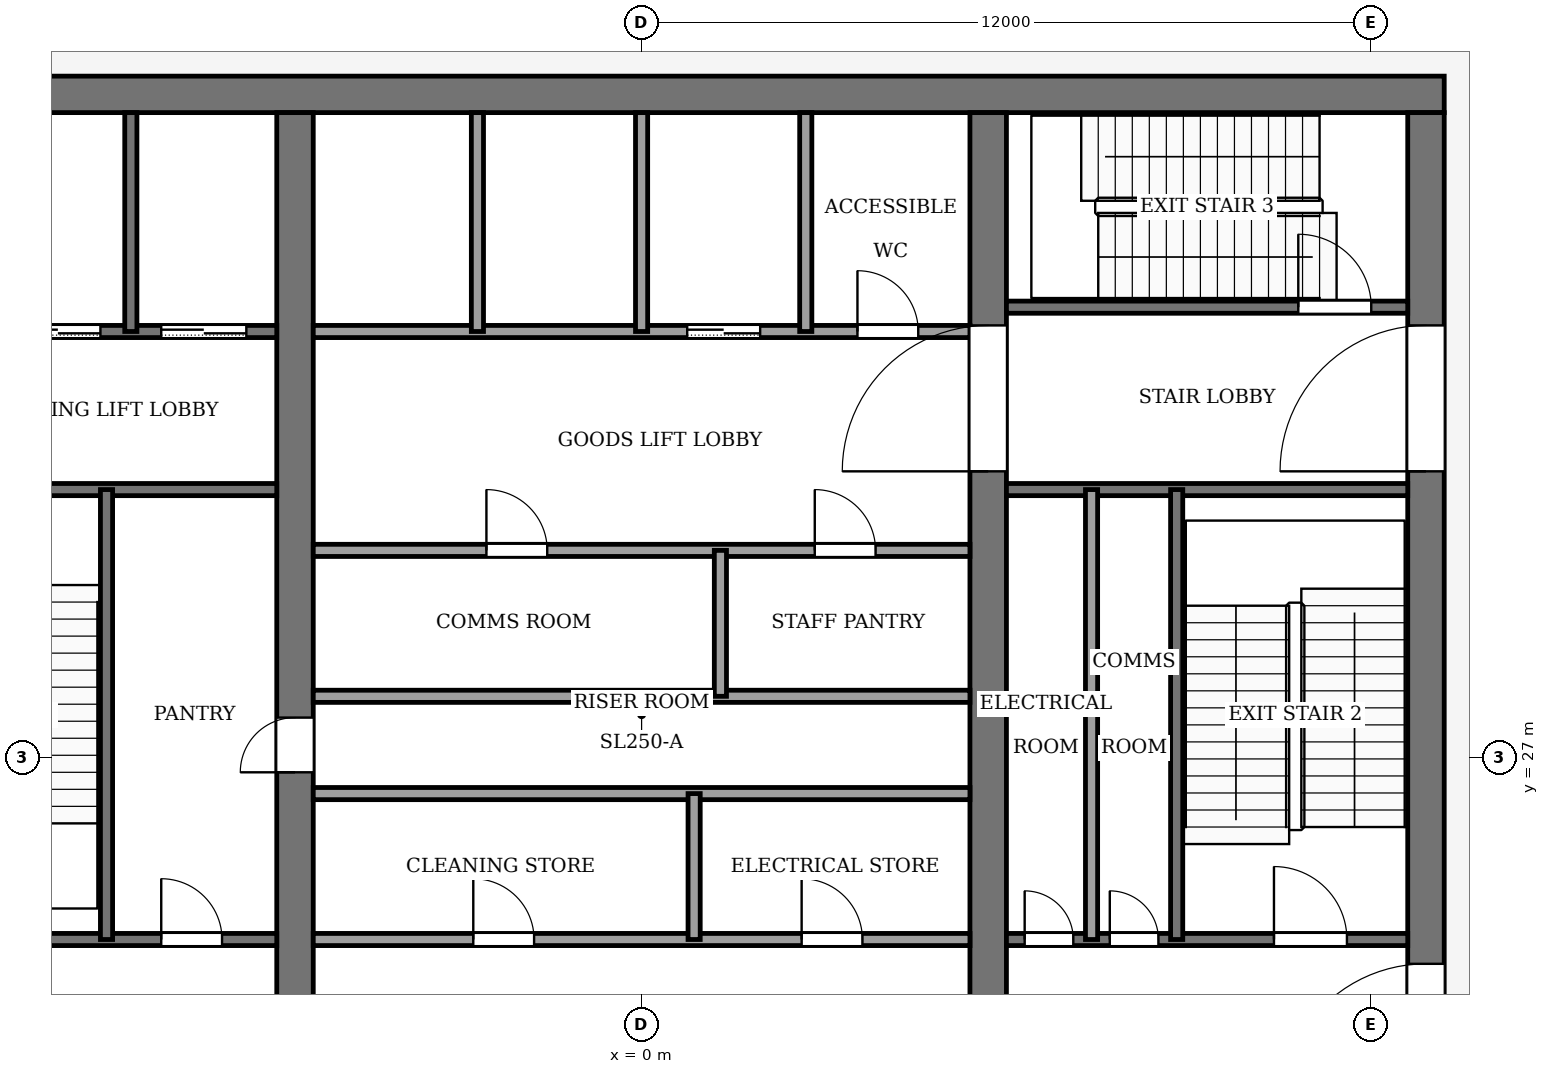
"""IFC4 building model, lengths in metres.
Left out: names, types, materials, properties, quantities, classifications, styles, units other than length and angle.
Written with IfcOpenShell. Run it as: python <this file> out.ifc"""

import sys

from ifc_helpers import new_model, si_unit, direction, frame, frame_2d, origin, place, context, subcontext, project, spatial, rectangle, extrude, element, fill, save


model = new_model("IFC4")
c1 = context("Model", 3, precision=1e-05, world=origin(), true_north=direction((0.0, 1.0)))
c2 = subcontext(c1, "Body", "Model", "MODEL_VIEW")
j1 = project(units=[si_unit("LENGTHUNIT", "METRE"), si_unit("PLANEANGLEUNIT", "RADIAN")], contexts=[c1])
p1 = place(None, origin())
s1 = spatial("IfcSite", under=j1, at=p1, CompositionType="ELEMENT")
p2 = place(p1, origin())
s2 = spatial("IfcBuilding", under=s1, at=p2, CompositionType="ELEMENT")
p3 = place(p2, frame((0.0, 0.0, 289.0)))
s3 = spatial("IfcBuildingStorey", under=s2, at=p3, CompositionType="ELEMENT", Elevation=289.0)
p4 = place(p3, frame((-13.2, 37.9, -0.13), z_axis=(0.0, 0.0, 1.0), x_axis=(1.0, 0.0, 0.0)))
e1 = element("IfcWall", 1, at=p4, inside=s3, PredefinedType="SHEAR", context=c2, shape_type="SweptSolid", body=[
    extrude(rectangle(XDim=26.4, YDim=0.6, at=frame_2d((13.2, 0.0))), origin(), (0.0, 0.0, 1.0), 5.0),
])
p5 = place(p3, frame((12.9, 18.4, -0.13), z_axis=(0.0, 0.0, 1.0), x_axis=(0.0, 1.0, 0.0)))
e2 = element("IfcWall", 2, at=p5, inside=s3, PredefinedType="SHEAR", context=c2, shape_type="SweptSolid", body=[
    extrude(rectangle(XDim=19.2, YDim=0.6, at=frame_2d((9.6, 0.0))), origin(), (0.0, 0.0, 1.0), 5.0),
])
p6 = place(p5, frame((2.8, 0.0, 0.13)))
e3 = element("IfcOpeningElement", 3, at=p6, cuts=e2, PredefinedType="OPENING", context=c2, shape_type="SweptSolid", body=[
    extrude(rectangle(XDim=2.4, YDim=2.4, at=frame_2d((1.2, 1.2))), frame((0.0, 0.31, 0.0), z_axis=(0.0, -1.0, 0.0), x_axis=(1.0, 0.0, 0.0)), (0.0, 0.0, 1.0), 0.62),
])
p7 = place(p5, frame((13.3, 0.0, 0.13)))
e4 = element("IfcOpeningElement", 4, at=p7, cuts=e2, PredefinedType="OPENING", context=c2, shape_type="SweptSolid", body=[
    extrude(rectangle(XDim=2.4, YDim=2.4, at=frame_2d((1.2, 1.2))), frame((0.0, 0.31, 0.0), z_axis=(0.0, -1.0, 0.0), x_axis=(1.0, 0.0, 0.0)), (0.0, 0.0, 1.0), 0.62),
])
p8 = place(p3, frame((-5.7, 18.4, -0.13), z_axis=(0.0, 0.0, 1.0), x_axis=(0.0, 1.0, 0.0)))
e5 = element("IfcWall", 5, at=p8, inside=s3, PredefinedType="SHEAR", context=c2, shape_type="SweptSolid", body=[
    extrude(rectangle(XDim=19.2, YDim=0.6, at=frame_2d((9.6, 0.0))), origin(), (0.0, 0.0, 1.0), 5.0),
])
p9 = place(p8, frame((8.35, 0.0, 0.13)))
e6 = element("IfcOpeningElement", 6, at=p9, cuts=e5, PredefinedType="OPENING", context=c2, shape_type="SweptSolid", body=[
    extrude(rectangle(XDim=0.9, YDim=2.1, at=frame_2d((0.45, 1.05))), frame((0.0, 0.31, 0.0), z_axis=(0.0, -1.0, 0.0), x_axis=(1.0, 0.0, 0.0)), (0.0, 0.0, 1.0), 0.62),
])
p10 = place(p3, frame((5.7, 18.4, -0.13), z_axis=(0.0, 0.0, 1.0), x_axis=(0.0, 1.0, 0.0)))
e7 = element("IfcWall", 7, at=p10, inside=s3, PredefinedType="SHEAR", context=c2, shape_type="SweptSolid", body=[
    extrude(rectangle(XDim=19.2, YDim=0.6, at=frame_2d((9.6, 0.0))), origin(), (0.0, 0.0, 1.0), 5.0),
])
p11 = place(p10, frame((13.3, 0.0, 0.13)))
e8 = element("IfcOpeningElement", 8, at=p11, cuts=e7, PredefinedType="OPENING", context=c2, shape_type="SweptSolid", body=[
    extrude(rectangle(XDim=2.4, YDim=2.4, at=frame_2d((1.2, 1.2))), frame((0.0, 0.31, 0.0), z_axis=(0.0, -1.0, 0.0), x_axis=(1.0, 0.0, 0.0)), (0.0, 0.0, 1.0), 0.62),
])
p12 = place(p3, frame((-12.6, 24.0, 0.0), z_axis=(0.0, 0.0, 1.0), x_axis=(1.0, 0.0, 0.0)))
e9 = element("IfcWall", 9, at=p12, inside=s3, PredefinedType="PARTITIONING", context=c2, shape_type="SweptSolid", body=[
    extrude(rectangle(XDim=6.6, YDim=0.2, at=frame_2d((3.3, 0.0))), origin(), (0.0, 0.0, 1.0), 4.87),
])
p13 = place(p12, frame((4.7, 0.0, 0.0)))
e10 = element("IfcOpeningElement", 10, at=p13, cuts=e9, PredefinedType="OPENING", context=c2, shape_type="SweptSolid", body=[
    extrude(rectangle(XDim=1.0, YDim=2.1, at=frame_2d((0.5, 1.05))), frame((0.0, 0.11, 0.0), z_axis=(0.0, -1.0, 0.0), x_axis=(1.0, 0.0, 0.0)), (0.0, 0.0, 1.0), 0.22),
])
p14 = place(p3, frame((-5.4, 24.0, 0.0), z_axis=(0.0, 0.0, 1.0), x_axis=(1.0, 0.0, 0.0)))
e11 = element("IfcWall", 11, at=p14, inside=s3, PredefinedType="PARTITIONING", context=c2, shape_type="SweptSolid", body=[
    extrude(rectangle(XDim=10.8, YDim=0.2, at=frame_2d((5.4, 0.0))), origin(), (0.0, 0.0, 1.0), 4.87),
])
p15 = place(p14, frame((2.632, 0.0, 0.0)))
e12 = element("IfcOpeningElement", 12, at=p15, cuts=e11, PredefinedType="OPENING", context=c2, shape_type="SweptSolid", body=[
    extrude(rectangle(XDim=1.0, YDim=2.1, at=frame_2d((0.5, 1.05))), frame((0.0, 0.11, 0.0), z_axis=(0.0, -1.0, 0.0), x_axis=(1.0, 0.0, 0.0)), (0.0, 0.0, 1.0), 0.22),
])
p16 = place(p14, frame((8.032, 0.0, 0.0)))
e13 = element("IfcOpeningElement", 13, at=p16, cuts=e11, PredefinedType="OPENING", context=c2, shape_type="SweptSolid", body=[
    extrude(rectangle(XDim=1.0, YDim=2.1, at=frame_2d((0.5, 1.05))), frame((0.0, 0.11, 0.0), z_axis=(0.0, -1.0, 0.0), x_axis=(1.0, 0.0, 0.0)), (0.0, 0.0, 1.0), 0.22),
])
p17 = place(p3, frame((6.0, 24.0, 0.0), z_axis=(0.0, 0.0, 1.0), x_axis=(1.0, 0.0, 0.0)))
e14 = element("IfcWall", 14, at=p17, inside=s3, PredefinedType="PARTITIONING", context=c2, shape_type="SweptSolid", body=[
    extrude(rectangle(XDim=6.6, YDim=0.2, at=frame_2d((3.3, 0.0))), origin(), (0.0, 0.0, 1.0), 4.87),
])
p18 = place(p17, frame((0.3, 0.0, 0.0)))
e15 = element("IfcOpeningElement", 15, at=p18, cuts=e14, PredefinedType="OPENING", context=c2, shape_type="SweptSolid", body=[
    extrude(rectangle(XDim=0.8, YDim=2.1, at=frame_2d((0.4, 1.05))), frame((0.0, 0.11, 0.0), z_axis=(0.0, -1.0, 0.0), x_axis=(1.0, 0.0, 0.0)), (0.0, 0.0, 1.0), 0.22),
])
p19 = place(p17, frame((1.7, 0.0, 0.0)))
e16 = element("IfcOpeningElement", 16, at=p19, cuts=e14, PredefinedType="OPENING", context=c2, shape_type="SweptSolid", body=[
    extrude(rectangle(XDim=0.8, YDim=2.1, at=frame_2d((0.4, 1.05))), frame((0.0, 0.11, 0.0), z_axis=(0.0, -1.0, 0.0), x_axis=(1.0, 0.0, 0.0)), (0.0, 0.0, 1.0), 0.22),
])
p20 = place(p17, frame((4.4, 0.0, 0.0)))
e17 = element("IfcOpeningElement", 17, at=p20, cuts=e14, PredefinedType="OPENING", context=c2, shape_type="SweptSolid", body=[
    extrude(rectangle(XDim=1.2, YDim=2.2, at=frame_2d((0.6, 1.1))), frame((0.0, 0.11, 0.0), z_axis=(0.0, -1.0, 0.0), x_axis=(1.0, 0.0, 0.0)), (0.0, 0.0, 1.0), 0.22),
])
for number, where, z_axis, x_axis in (
    (18, (-5.4, 26.4, 0.0), (0.0, 0.0, 1.0), (1.0, 0.0, 0.0)),
    (19, (-5.4, 28.0, 0.0), (0.0, 0.0, 1.0), (1.0, 0.0, 0.0)),
):
    element("IfcWall", number, at=place(p3, frame(where, z_axis=z_axis, x_axis=x_axis)), inside=s3, PredefinedType="PARTITIONING", context=c2, shape_type="SweptSolid", body=[
        extrude(rectangle(XDim=10.8, YDim=0.2, at=frame_2d((5.4, 0.0))), origin(), (0.0, 0.0, 1.0), 4.87),
    ])
p21 = place(p3, frame((-5.4, 30.4, 0.0), z_axis=(0.0, 0.0, 1.0), x_axis=(1.0, 0.0, 0.0)))
e20 = element("IfcWall", 20, at=p21, inside=s3, PredefinedType="PARTITIONING", context=c2, shape_type="SweptSolid", body=[
    extrude(rectangle(XDim=10.8, YDim=0.2, at=frame_2d((5.4, 0.0))), origin(), (0.0, 0.0, 1.0), 4.87),
])
p22 = place(p21, frame((2.848, 0.0, 0.0)))
e21 = element("IfcOpeningElement", 21, at=p22, cuts=e20, PredefinedType="OPENING", context=c2, shape_type="SweptSolid", body=[
    extrude(rectangle(XDim=1.0, YDim=2.1, at=frame_2d((0.5, 1.05))), frame((0.0, 0.11, 0.0), z_axis=(0.0, -1.0, 0.0), x_axis=(1.0, 0.0, 0.0)), (0.0, 0.0, 1.0), 0.22),
])
p23 = place(p21, frame((8.248, 0.0, 0.0)))
e22 = element("IfcOpeningElement", 22, at=p23, cuts=e20, PredefinedType="OPENING", context=c2, shape_type="SweptSolid", body=[
    extrude(rectangle(XDim=1.0, YDim=2.1, at=frame_2d((0.5, 1.05))), frame((0.0, 0.11, 0.0), z_axis=(0.0, -1.0, 0.0), x_axis=(1.0, 0.0, 0.0)), (0.0, 0.0, 1.0), 0.22),
])
p24 = place(p3, frame((-12.6, 31.4, 0.0), z_axis=(0.0, 0.0, 1.0), x_axis=(1.0, 0.0, 0.0)))
e23 = element("IfcWall", 23, at=p24, inside=s3, PredefinedType="PARTITIONING", context=c2, shape_type="SweptSolid", body=[
    extrude(rectangle(XDim=6.6, YDim=0.2, at=frame_2d((3.3, 0.0))), origin(), (0.0, 0.0, 1.0), 4.87),
])
p25 = place(p24, frame((1.0, 0.0, 0.0)))
e24 = element("IfcOpeningElement", 24, at=p25, cuts=e23, PredefinedType="OPENING", context=c2, shape_type="SweptSolid", body=[
    extrude(rectangle(XDim=1.2, YDim=2.2, at=frame_2d((0.6, 1.1))), frame((0.0, 0.11, 0.0), z_axis=(0.0, -1.0, 0.0), x_axis=(1.0, 0.0, 0.0)), (0.0, 0.0, 1.0), 0.22),
])
p26 = place(p3, frame((6.0, 31.4, 0.0), z_axis=(0.0, 0.0, 1.0), x_axis=(1.0, 0.0, 0.0)))
e25 = element("IfcWall", 25, at=p26, inside=s3, PredefinedType="PARTITIONING", context=c2, shape_type="SweptSolid", body=[
    extrude(rectangle(XDim=6.6, YDim=0.2, at=frame_2d((3.3, 0.0))), origin(), (0.0, 0.0, 1.0), 4.87),
])
p27 = place(p3, frame((-12.6, 34.0, 0.0), z_axis=(0.0, 0.0, 1.0), x_axis=(1.0, 0.0, 0.0)))
e26 = element("IfcWall", 26, at=p27, inside=s3, PredefinedType="PARTITIONING", context=c2, shape_type="SweptSolid", body=[
    extrude(rectangle(XDim=6.6, YDim=0.2, at=frame_2d((3.3, 0.0))), origin(), (0.0, 0.0, 1.0), 4.87),
])
p28 = place(p27, frame((4.7, 0.0, 0.0)))
e27 = element("IfcOpeningElement", 27, at=p28, cuts=e26, PredefinedType="OPENING", context=c2, shape_type="SweptSolid", body=[
    extrude(rectangle(XDim=1.4, YDim=2.2, at=frame_2d((0.7, 1.1))), frame((0.0, 0.11, 0.0), z_axis=(0.0, -1.0, 0.0), x_axis=(1.0, 0.0, 0.0)), (0.0, 0.0, 1.0), 0.22),
])
p29 = place(p27, frame((2.3, 0.0, 0.0)))
e28 = element("IfcOpeningElement", 28, at=p29, cuts=e26, PredefinedType="OPENING", context=c2, shape_type="SweptSolid", body=[
    extrude(rectangle(XDim=1.4, YDim=2.2, at=frame_2d((0.7, 1.1))), frame((0.0, 0.11, 0.0), z_axis=(0.0, -1.0, 0.0), x_axis=(1.0, 0.0, 0.0)), (0.0, 0.0, 1.0), 0.22),
])
p30 = place(p27, frame((0.45, 0.0, 0.0)))
e29 = element("IfcOpeningElement", 29, at=p30, cuts=e26, PredefinedType="OPENING", context=c2, shape_type="SweptSolid", body=[
    extrude(rectangle(XDim=0.9, YDim=2.1, at=frame_2d((0.45, 1.05))), frame((0.0, 0.11, 0.0), z_axis=(0.0, -1.0, 0.0), x_axis=(1.0, 0.0, 0.0)), (0.0, 0.0, 1.0), 0.22),
])
p31 = place(p3, frame((-5.4, 34.0, 0.0), z_axis=(0.0, 0.0, 1.0), x_axis=(1.0, 0.0, 0.0)))
e30 = element("IfcWall", 30, at=p31, inside=s3, PredefinedType="PARTITIONING", context=c2, shape_type="SweptSolid", body=[
    extrude(rectangle(XDim=10.8, YDim=0.2, at=frame_2d((5.4, 0.0))), origin(), (0.0, 0.0, 1.0), 4.87),
])
p32 = place(p31, frame((6.15, 0.0, 0.0)))
e31 = element("IfcOpeningElement", 31, at=p32, cuts=e30, PredefinedType="OPENING", context=c2, shape_type="SweptSolid", body=[
    extrude(rectangle(XDim=1.2, YDim=2.2, at=frame_2d((0.6, 1.1))), frame((0.0, 0.11, 0.0), z_axis=(0.0, -1.0, 0.0), x_axis=(1.0, 0.0, 0.0)), (0.0, 0.0, 1.0), 0.22),
])
p33 = place(p31, frame((8.95, 0.0, 0.0)))
e32 = element("IfcOpeningElement", 32, at=p33, cuts=e30, PredefinedType="OPENING", context=c2, shape_type="SweptSolid", body=[
    extrude(rectangle(XDim=1.0, YDim=2.1, at=frame_2d((0.5, 1.05))), frame((0.0, 0.11, 0.0), z_axis=(0.0, -1.0, 0.0), x_axis=(1.0, 0.0, 0.0)), (0.0, 0.0, 1.0), 0.22),
])
p34 = place(p3, frame((6.0, 34.4, 0.0), z_axis=(0.0, 0.0, 1.0), x_axis=(1.0, 0.0, 0.0)))
e33 = element("IfcWall", 33, at=p34, inside=s3, PredefinedType="PARTITIONING", context=c2, shape_type="SweptSolid", body=[
    extrude(rectangle(XDim=6.6, YDim=0.2, at=frame_2d((3.3, 0.0))), origin(), (0.0, 0.0, 1.0), 4.87),
])
p35 = place(p34, frame((4.8, 0.0, 0.0)))
e34 = element("IfcOpeningElement", 34, at=p35, cuts=e33, PredefinedType="OPENING", context=c2, shape_type="SweptSolid", body=[
    extrude(rectangle(XDim=1.2, YDim=2.2, at=frame_2d((0.6, 1.1))), frame((0.0, 0.11, 0.0), z_axis=(0.0, -1.0, 0.0), x_axis=(1.0, 0.0, 0.0)), (0.0, 0.0, 1.0), 0.22),
])
p36 = place(p3, frame((-8.8, 24.0, 0.0), z_axis=(0.0, 0.0, 1.0), x_axis=(0.0, 1.0, 0.0)))
e35 = element("IfcWall", 35, at=p36, inside=s3, PredefinedType="PARTITIONING", context=c2, shape_type="SweptSolid", body=[
    extrude(rectangle(XDim=7.4, YDim=0.2, at=frame_2d((3.7, 0.0))), origin(), (0.0, 0.0, 1.0), 4.87),
])
for number, where, z_axis, x_axis in (
    (36, (-8.4, 34.0, 0.0), (0.0, 0.0, 1.0), (0.0, 1.0, 0.0)),
    (37, (-2.7, 34.0, 0.0), (0.0, 0.0, 1.0), (0.0, 1.0, 0.0)),
    (38, (0.0, 34.0, 0.0), (0.0, 0.0, 1.0), (0.0, 1.0, 0.0)),
):
    element("IfcWall", number, at=place(p3, frame(where, z_axis=z_axis, x_axis=x_axis)), inside=s3, PredefinedType="PARTITIONING", context=c2, shape_type="SweptSolid", body=[
        extrude(rectangle(XDim=3.6, YDim=0.2, at=frame_2d((1.8, 0.0))), origin(), (0.0, 0.0, 1.0), 4.87),
    ])
for number, where, z_axis, x_axis in (
    (39, (0.864, 24.0, 0.0), (0.0, 0.0, 1.0), (0.0, 1.0, 0.0)),
    (40, (1.296, 28.0, 0.0), (0.0, 0.0, 1.0), (0.0, 1.0, 0.0)),
):
    element("IfcWall", number, at=place(p3, frame(where, z_axis=z_axis, x_axis=x_axis)), inside=s3, PredefinedType="PARTITIONING", context=c2, shape_type="SweptSolid", body=[
        extrude(rectangle(XDim=2.4, YDim=0.2, at=frame_2d((1.2, 0.0))), origin(), (0.0, 0.0, 1.0), 4.87),
    ])
p37 = place(p3, frame((2.7, 34.0, 0.0), z_axis=(0.0, 0.0, 1.0), x_axis=(0.0, 1.0, 0.0)))
e41 = element("IfcWall", 41, at=p37, inside=s3, PredefinedType="PARTITIONING", context=c2, shape_type="SweptSolid", body=[
    extrude(rectangle(XDim=3.6, YDim=0.2, at=frame_2d((1.8, 0.0))), origin(), (0.0, 0.0, 1.0), 4.87),
])
for number, where, z_axis, x_axis in (
    (42, (7.4, 24.0, 0.0), (0.0, 0.0, 1.0), (0.0, 1.0, 0.0)),
    (43, (8.8, 24.0, 0.0), (0.0, 0.0, 1.0), (0.0, 1.0, 0.0)),
):
    element("IfcWall", number, at=place(p3, frame(where, z_axis=z_axis, x_axis=x_axis)), inside=s3, PredefinedType="PARTITIONING", context=c2, shape_type="SweptSolid", body=[
        extrude(rectangle(XDim=7.4, YDim=0.2, at=frame_2d((3.7, 0.0))), origin(), (0.0, 0.0, 1.0), 4.87),
    ])
p38 = place(p32, origin())
e44 = element("IfcDoor", 44, at=p38, inside=s3, OperationType="SLIDING_TO_LEFT", PredefinedType="DOOR", context=c2, shape_type="SweptSolid", body=[
    extrude(rectangle(XDim=1.2, YDim=2.2, at=frame_2d((0.6, 1.1))), frame((0.0, 0.025, 0.0), z_axis=(0.0, -1.0, 0.0), x_axis=(1.0, 0.0, 0.0)), (0.0, 0.0, 1.0), 0.05),
])
fill(e31, e44)
p39 = place(p28, origin())
e45 = element("IfcDoor", 45, at=p39, inside=s3, OperationType="SLIDING_TO_LEFT", PredefinedType="DOOR", context=c2, shape_type="SweptSolid", body=[
    extrude(rectangle(XDim=1.4, YDim=2.2, at=frame_2d((0.7, 1.1))), frame((0.0, 0.025, 0.0), z_axis=(0.0, -1.0, 0.0), x_axis=(1.0, 0.0, 0.0)), (0.0, 0.0, 1.0), 0.05),
])
fill(e27, e45)
p40 = place(p29, origin())
e46 = element("IfcDoor", 46, at=p40, inside=s3, OperationType="SLIDING_TO_LEFT", PredefinedType="DOOR", context=c2, shape_type="SweptSolid", body=[
    extrude(rectangle(XDim=1.4, YDim=2.2, at=frame_2d((0.7, 1.1))), frame((0.0, 0.025, 0.0), z_axis=(0.0, -1.0, 0.0), x_axis=(1.0, 0.0, 0.0)), (0.0, 0.0, 1.0), 0.05),
])
fill(e28, e46)
p41 = place(p15, origin())
e47 = element("IfcDoor", 47, at=p41, inside=s3, OperationType="SINGLE_SWING_LEFT", PredefinedType="DOOR", context=c2, shape_type="SweptSolid", body=[
    extrude(rectangle(XDim=1.0, YDim=2.1, at=frame_2d((0.5, 1.05))), frame((0.0, 0.025, 0.0), z_axis=(0.0, -1.0, 0.0), x_axis=(1.0, 0.0, 0.0)), (0.0, 0.0, 1.0), 0.05),
])
fill(e12, e47)
p42 = place(p16, origin())
e48 = element("IfcDoor", 48, at=p42, inside=s3, OperationType="SINGLE_SWING_RIGHT", PredefinedType="DOOR", context=c2, shape_type="SweptSolid", body=[
    extrude(rectangle(XDim=1.0, YDim=2.1, at=frame_2d((0.5, 1.05))), frame((0.0, 0.025, 0.0), z_axis=(0.0, -1.0, 0.0), x_axis=(1.0, 0.0, 0.0)), (0.0, 0.0, 1.0), 0.05),
])
fill(e13, e48)
p43 = place(p22, origin())
e49 = element("IfcDoor", 49, at=p43, inside=s3, OperationType="SINGLE_SWING_LEFT", PredefinedType="DOOR", context=c2, shape_type="SweptSolid", body=[
    extrude(rectangle(XDim=1.0, YDim=2.1, at=frame_2d((0.5, 1.05))), frame((0.0, 0.025, 0.0), z_axis=(0.0, -1.0, 0.0), x_axis=(1.0, 0.0, 0.0)), (0.0, 0.0, 1.0), 0.05),
])
fill(e21, e49)
p44 = place(p23, origin())
e50 = element("IfcDoor", 50, at=p44, inside=s3, OperationType="SINGLE_SWING_RIGHT", PredefinedType="DOOR", context=c2, shape_type="SweptSolid", body=[
    extrude(rectangle(XDim=1.0, YDim=2.1, at=frame_2d((0.5, 1.05))), frame((0.0, 0.025, 0.0), z_axis=(0.0, -1.0, 0.0), x_axis=(1.0, 0.0, 0.0)), (0.0, 0.0, 1.0), 0.05),
])
fill(e22, e50)
p45 = place(p13, origin())
e51 = element("IfcDoor", 51, at=p45, inside=s3, OperationType="SINGLE_SWING_RIGHT", PredefinedType="DOOR", context=c2, shape_type="SweptSolid", body=[
    extrude(rectangle(XDim=1.0, YDim=2.1, at=frame_2d((0.5, 1.05))), frame((0.0, 0.025, 0.0), z_axis=(0.0, -1.0, 0.0), x_axis=(1.0, 0.0, 0.0)), (0.0, 0.0, 1.0), 0.05),
])
fill(e10, e51)
p46 = place(p18, origin())
e52 = element("IfcDoor", 52, at=p46, inside=s3, OperationType="SINGLE_SWING_RIGHT", PredefinedType="DOOR", context=c2, shape_type="SweptSolid", body=[
    extrude(rectangle(XDim=0.8, YDim=2.1, at=frame_2d((0.4, 1.05))), frame((0.0, 0.025, 0.0), z_axis=(0.0, -1.0, 0.0), x_axis=(1.0, 0.0, 0.0)), (0.0, 0.0, 1.0), 0.05),
])
fill(e15, e52)
p47 = place(p19, origin())
e53 = element("IfcDoor", 53, at=p47, inside=s3, OperationType="SINGLE_SWING_LEFT", PredefinedType="DOOR", context=c2, shape_type="SweptSolid", body=[
    extrude(rectangle(XDim=0.8, YDim=2.1, at=frame_2d((0.4, 1.05))), frame((0.0, 0.025, 0.0), z_axis=(0.0, -1.0, 0.0), x_axis=(1.0, 0.0, 0.0)), (0.0, 0.0, 1.0), 0.05),
])
fill(e16, e53)
p48 = place(p33, origin())
e54 = element("IfcDoor", 54, at=p48, inside=s3, OperationType="SINGLE_SWING_LEFT", PredefinedType="DOOR", context=c2, shape_type="SweptSolid", body=[
    extrude(rectangle(XDim=1.0, YDim=2.1, at=frame_2d((0.5, 1.05))), frame((0.0, 0.025, 0.0), z_axis=(0.0, -1.0, 0.0), x_axis=(1.0, 0.0, 0.0)), (0.0, 0.0, 1.0), 0.05),
])
fill(e32, e54)
p49 = place(p9, origin())
e55 = element("IfcDoor", 55, at=p49, inside=s3, OperationType="SINGLE_SWING_LEFT", PredefinedType="DOOR", context=c2, shape_type="SweptSolid", body=[
    extrude(rectangle(XDim=0.9, YDim=2.1, at=frame_2d((0.45, 1.05))), frame((0.0, 0.025, 0.0), z_axis=(0.0, -1.0, 0.0), x_axis=(1.0, 0.0, 0.0)), (0.0, 0.0, 1.0), 0.05),
])
fill(e6, e55)
p50 = place(p20, origin())
e56 = element("IfcDoor", 56, at=p50, inside=s3, OperationType="SINGLE_SWING_RIGHT", PredefinedType="DOOR", context=c2, shape_type="SweptSolid", body=[
    extrude(rectangle(XDim=1.2, YDim=2.2, at=frame_2d((0.6, 1.1))), frame((0.0, 0.025, 0.0), z_axis=(0.0, -1.0, 0.0), x_axis=(1.0, 0.0, 0.0)), (0.0, 0.0, 1.0), 0.05),
])
fill(e17, e56)
p51 = place(p35, origin())
e57 = element("IfcDoor", 57, at=p51, inside=s3, OperationType="SINGLE_SWING_LEFT", PredefinedType="DOOR", context=c2, shape_type="SweptSolid", body=[
    extrude(rectangle(XDim=1.2, YDim=2.2, at=frame_2d((0.6, 1.1))), frame((0.0, 0.025, 0.0), z_axis=(0.0, -1.0, 0.0), x_axis=(1.0, 0.0, 0.0)), (0.0, 0.0, 1.0), 0.05),
])
fill(e34, e57)
p52 = place(p11, origin())
e58 = element("IfcDoor", 58, at=p52, inside=s3, OperationType="DOUBLE_DOOR_SINGLE_SWING", PredefinedType="DOOR", context=c2, shape_type="SweptSolid", body=[
    extrude(rectangle(XDim=2.4, YDim=2.4, at=frame_2d((1.2, 1.2))), frame((0.0, 0.025, 0.0), z_axis=(0.0, -1.0, 0.0), x_axis=(1.0, 0.0, 0.0)), (0.0, 0.0, 1.0), 0.05),
])
fill(e8, e58)
p53 = place(p6, origin())
e59 = element("IfcDoor", 59, at=p53, inside=s3, OperationType="DOUBLE_DOOR_SINGLE_SWING", PredefinedType="DOOR", context=c2, shape_type="SweptSolid", body=[
    extrude(rectangle(XDim=2.4, YDim=2.4, at=frame_2d((1.2, 1.2))), frame((0.0, 0.025, 0.0), z_axis=(0.0, -1.0, 0.0), x_axis=(1.0, 0.0, 0.0)), (0.0, 0.0, 1.0), 0.05),
])
fill(e3, e59)
p54 = place(p7, origin())
e60 = element("IfcDoor", 60, at=p54, inside=s3, OperationType="DOUBLE_DOOR_SINGLE_SWING", PredefinedType="DOOR", context=c2, shape_type="SweptSolid", body=[
    extrude(rectangle(XDim=2.4, YDim=2.4, at=frame_2d((1.2, 1.2))), frame((0.0, 0.025, 0.0), z_axis=(0.0, -1.0, 0.0), x_axis=(1.0, 0.0, 0.0)), (0.0, 0.0, 1.0), 0.05),
])
fill(e4, e60)
save(model, sys.argv[1])
